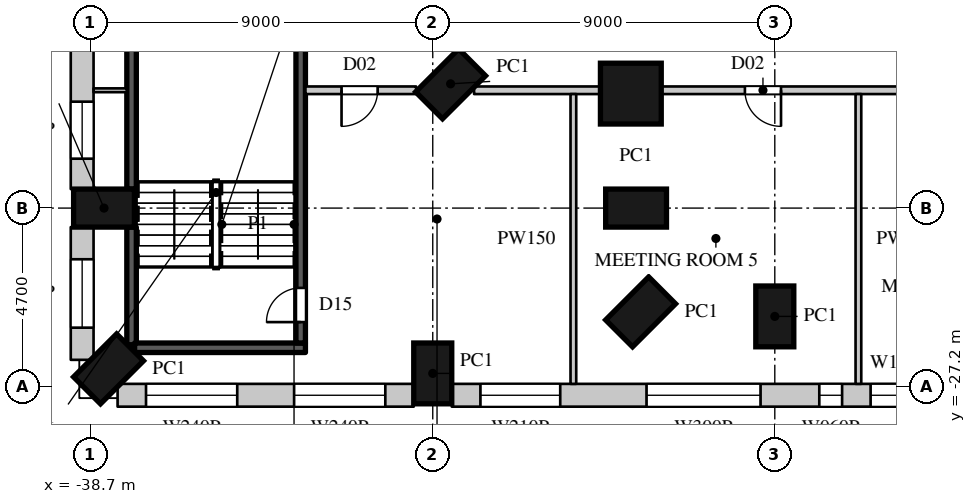
"""IFC4 building model, lengths in metres.
Left out: names, types, materials, properties, quantities, classifications, styles, units other than length and angle.
Written with IfcOpenShell. Run it as: python <this file> out.ifc"""

import sys

from ifc_helpers import new_model, si_unit, direction, frame, frame_2d, origin, origin_2d, place, context, subcontext, project, spatial, rectangle, circle, extrude, element, fill, save


model = new_model("IFC4")
c1 = context("Model", 3, precision=1e-05, world=origin(), true_north=direction((0.0, 1.0)))
c2 = subcontext(c1, "Body", "Model", "MODEL_VIEW")
j1 = project(units=[si_unit("LENGTHUNIT", "METRE"), si_unit("PLANEANGLEUNIT", "RADIAN")], contexts=[c1])
p1 = place(None, origin())
s1 = spatial("IfcSite", under=j1, at=p1, CompositionType="ELEMENT")
p2 = place(p1, origin())
s2 = spatial("IfcBuilding", under=s1, at=p2, CompositionType="ELEMENT")
p3 = place(p2, frame((0.0, 0.0, 44.0)))
s3 = spatial("IfcBuildingStorey", under=s2, at=p3, CompositionType="ELEMENT", Elevation=44.0)
p4 = place(p3, frame((-29.231, -19.231, 0.0), z_axis=(0.0, 0.0, 1.0), x_axis=(0.707106781187, -0.707106781187, 0.0)))
e1 = element("IfcColumn", 1, at=p4, inside=s3, PredefinedType="COLUMN", context=c2, shape_type="SweptSolid", body=[
    extrude(rectangle(XDim=1.0, YDim=1.6, at=origin_2d()), origin(), (0.0, 0.0, 1.0), 6.0),
])
p5 = place(p3, frame((-24.488, -19.488, 0.0), z_axis=(0.0, 0.0, 1.0), x_axis=(1.0, 0.0, 0.0)))
e2 = element("IfcColumn", 2, at=p5, inside=s3, PredefinedType="COLUMN", context=c2, shape_type="SweptSolid", body=[
    extrude(circle(Radius=0.8, at=origin_2d()), origin(), (0.0, 0.0, 1.0), 6.0),
])
for number, where, z_axis, x_axis in (
    (3, (-24.35, -22.5, 0.0), (0.0, 0.0, 1.0), (0.0, -1.0, 0.0)),
    (4, (-24.231, -25.231, 0.0), (0.0, 0.0, 1.0), (0.707, -0.707, 0.0)),
    (5, (-20.7, -25.35, 0.0), (0.0, 0.0, 1.0), (1.0, 0.0, 0.0)),
    (6, (-38.231, -26.731, 0.0), (0.0, 0.0, 1.0), (0.707, -0.707, 0.0)),
    (7, (-29.7, -26.85, 0.0), (0.0, 0.0, 1.0), (1.0, 0.0, 0.0)),
    (8, (-38.35, -22.5, 0.0), (0.0, 0.0, 1.0), (0.0, -1.0, 0.0)),
):
    element("IfcColumn", number, at=place(p3, frame(where, z_axis=z_axis, x_axis=x_axis)), inside=s3, PredefinedType="COLUMN", context=c2, shape_type="SweptSolid", body=[
        extrude(rectangle(XDim=1.0, YDim=1.6, at=origin_2d()), origin(), (0.0, 0.0, 1.0), 6.0),
    ])
p6 = place(p3, frame((-37.993, -27.425, 0.0), z_axis=(0.0, 0.0, 1.0), x_axis=(1.0, 0.0, 0.0)))
e9 = element("IfcWall", 9, at=p6, inside=s3, PredefinedType="ELEMENTEDWALL", context=c2, shape_type="SweptSolid", body=[
    extrude(rectangle(XDim=7.793, YDim=0.6, at=frame_2d((3.896, 0.0))), origin(), (0.0, 0.0, 1.0), 5.596),
])
p7 = place(p6, frame((0.748, 0.0, 1.2)))
e10 = element("IfcOpeningElement", 10, at=p7, cuts=e9, PredefinedType="OPENING", context=c2, shape_type="SweptSolid", body=[
    extrude(rectangle(XDim=2.4, YDim=2.4, at=frame_2d((1.2, 1.2))), frame((0.0, 0.31, 0.0), z_axis=(0.0, -1.0, 0.0), x_axis=(1.0, 0.0, 0.0)), (0.0, 0.0, 1.0), 0.62),
])
p8 = place(p6, frame((4.645, 0.0, 1.2)))
e11 = element("IfcOpeningElement", 11, at=p8, cuts=e9, PredefinedType="OPENING", context=c2, shape_type="SweptSolid", body=[
    extrude(rectangle(XDim=2.4, YDim=2.4, at=frame_2d((1.2, 1.2))), frame((0.0, 0.31, 0.0), z_axis=(0.0, -1.0, 0.0), x_axis=(1.0, 0.0, 0.0)), (0.0, 0.0, 1.0), 0.62),
])
p9 = place(p3, frame((-29.2, -27.425, 0.0), z_axis=(0.0, 0.0, 1.0), x_axis=(1.0, 0.0, 0.0)))
e12 = element("IfcWall", 12, at=p9, inside=s3, PredefinedType="ELEMENTEDWALL", context=c2, shape_type="SweptSolid", body=[
    extrude(rectangle(XDim=53.0, YDim=0.6, at=frame_2d((26.5, 0.0))), origin(), (0.0, 0.0, 1.0), 5.596),
])
p10 = place(p9, frame((5.125, 0.0, 1.2)))
e13 = element("IfcOpeningElement", 13, at=p10, cuts=e12, PredefinedType="OPENING", context=c2, shape_type="SweptSolid", body=[
    extrude(rectangle(XDim=3.0, YDim=2.4, at=frame_2d((1.5, 1.2))), frame((0.0, 0.31, 0.0), z_axis=(0.0, -1.0, 0.0), x_axis=(1.0, 0.0, 0.0)), (0.0, 0.0, 1.0), 0.62),
])
p11 = place(p9, frame((22.792, 0.0, 1.2)))
e14 = element("IfcOpeningElement", 14, at=p11, cuts=e12, PredefinedType="OPENING", context=c2, shape_type="SweptSolid", body=[
    extrude(rectangle(XDim=3.0, YDim=2.4, at=frame_2d((1.5, 1.2))), frame((0.0, 0.31, 0.0), z_axis=(0.0, -1.0, 0.0), x_axis=(1.0, 0.0, 0.0)), (0.0, 0.0, 1.0), 0.62),
])
p12 = place(p9, frame((27.208, 0.0, 1.2)))
e15 = element("IfcOpeningElement", 15, at=p12, cuts=e12, PredefinedType="OPENING", context=c2, shape_type="SweptSolid", body=[
    extrude(rectangle(XDim=3.0, YDim=2.4, at=frame_2d((1.5, 1.2))), frame((0.0, 0.31, 0.0), z_axis=(0.0, -1.0, 0.0), x_axis=(1.0, 0.0, 0.0)), (0.0, 0.0, 1.0), 0.62),
])
p13 = place(p9, frame((31.625, 0.0, 1.2)))
e16 = element("IfcOpeningElement", 16, at=p13, cuts=e12, PredefinedType="OPENING", context=c2, shape_type="SweptSolid", body=[
    extrude(rectangle(XDim=3.0, YDim=2.4, at=frame_2d((1.5, 1.2))), frame((0.0, 0.31, 0.0), z_axis=(0.0, -1.0, 0.0), x_axis=(1.0, 0.0, 0.0)), (0.0, 0.0, 1.0), 0.62),
])
p14 = place(p9, frame((36.042, 0.0, 1.2)))
e17 = element("IfcOpeningElement", 17, at=p14, cuts=e12, PredefinedType="OPENING", context=c2, shape_type="SweptSolid", body=[
    extrude(rectangle(XDim=3.0, YDim=2.4, at=frame_2d((1.5, 1.2))), frame((0.0, 0.31, 0.0), z_axis=(0.0, -1.0, 0.0), x_axis=(1.0, 0.0, 0.0)), (0.0, 0.0, 1.0), 0.62),
])
p15 = place(p9, frame((40.458, 0.0, 1.2)))
e18 = element("IfcOpeningElement", 18, at=p15, cuts=e12, PredefinedType="OPENING", context=c2, shape_type="SweptSolid", body=[
    extrude(rectangle(XDim=3.0, YDim=2.4, at=frame_2d((1.5, 1.2))), frame((0.0, 0.31, 0.0), z_axis=(0.0, -1.0, 0.0), x_axis=(1.0, 0.0, 0.0)), (0.0, 0.0, 1.0), 0.62),
])
p16 = place(p9, frame((44.875, 0.0, 1.2)))
e19 = element("IfcOpeningElement", 19, at=p16, cuts=e12, PredefinedType="OPENING", context=c2, shape_type="SweptSolid", body=[
    extrude(rectangle(XDim=3.0, YDim=2.4, at=frame_2d((1.5, 1.2))), frame((0.0, 0.31, 0.0), z_axis=(0.0, -1.0, 0.0), x_axis=(1.0, 0.0, 0.0)), (0.0, 0.0, 1.0), 0.62),
])
p17 = place(p9, frame((49.292, 0.0, 1.2)))
e20 = element("IfcOpeningElement", 20, at=p17, cuts=e12, PredefinedType="OPENING", context=c2, shape_type="SweptSolid", body=[
    extrude(rectangle(XDim=3.0, YDim=2.4, at=frame_2d((1.5, 1.2))), frame((0.0, 0.31, 0.0), z_axis=(0.0, -1.0, 0.0), x_axis=(1.0, 0.0, 0.0)), (0.0, 0.0, 1.0), 0.62),
])
p18 = place(p9, frame((0.754, 0.0, 1.2)))
e21 = element("IfcOpeningElement", 21, at=p18, cuts=e12, PredefinedType="OPENING", context=c2, shape_type="SweptSolid", body=[
    extrude(rectangle(XDim=2.1, YDim=2.4, at=frame_2d((1.05, 1.2))), frame((0.0, 0.31, 0.0), z_axis=(0.0, -1.0, 0.0), x_axis=(1.0, 0.0, 0.0)), (0.0, 0.0, 1.0), 0.62),
])
p19 = place(p9, frame((9.671, 0.0, 1.2)))
e22 = element("IfcOpeningElement", 22, at=p19, cuts=e12, PredefinedType="OPENING", context=c2, shape_type="SweptSolid", body=[
    extrude(rectangle(XDim=0.6, YDim=2.4, at=frame_2d((0.3, 1.2))), frame((0.0, 0.31, 0.0), z_axis=(0.0, -1.0, 0.0), x_axis=(1.0, 0.0, 0.0)), (0.0, 0.0, 1.0), 0.62),
])
p20 = place(p9, frame((11.021, 0.0, 1.2)))
e23 = element("IfcOpeningElement", 23, at=p20, cuts=e12, PredefinedType="OPENING", context=c2, shape_type="SweptSolid", body=[
    extrude(rectangle(XDim=1.5, YDim=2.4, at=frame_2d((0.75, 1.2))), frame((0.0, 0.31, 0.0), z_axis=(0.0, -1.0, 0.0), x_axis=(1.0, 0.0, 0.0)), (0.0, 0.0, 1.0), 0.62),
])
p21 = place(p9, frame((14.029, 0.0, 1.2)))
e24 = element("IfcOpeningElement", 24, at=p21, cuts=e12, PredefinedType="OPENING", context=c2, shape_type="SweptSolid", body=[
    extrude(rectangle(XDim=1.8, YDim=2.4, at=frame_2d((0.9, 1.2))), frame((0.0, 0.31, 0.0), z_axis=(0.0, -1.0, 0.0), x_axis=(1.0, 0.0, 0.0)), (0.0, 0.0, 1.0), 0.62),
])
p22 = place(p9, frame((19.137, 0.0, 1.2)))
e25 = element("IfcOpeningElement", 25, at=p22, cuts=e12, PredefinedType="OPENING", context=c2, shape_type="SweptSolid", body=[
    extrude(rectangle(XDim=2.1, YDim=2.4, at=frame_2d((1.05, 1.2))), frame((0.0, 0.31, 0.0), z_axis=(0.0, -1.0, 0.0), x_axis=(1.0, 0.0, 0.0)), (0.0, 0.0, 1.0), 0.62),
])
p23 = place(p3, frame((-38.925, -14.0, 0.0), z_axis=(0.0, 0.0, 1.0), x_axis=(0.0, -1.0, 0.0)))
e26 = element("IfcWall", 26, at=p23, inside=s3, PredefinedType="ELEMENTEDWALL", context=c2, shape_type="SweptSolid", body=[
    extrude(rectangle(XDim=8.0, YDim=0.6, at=frame_2d((4.0, 0.0))), origin(), (0.0, 0.0, 1.0), 5.596),
])
p24 = place(p23, frame((1.35, 0.0, 1.2)))
e27 = element("IfcOpeningElement", 27, at=p24, cuts=e26, PredefinedType="OPENING", context=c2, shape_type="SweptSolid", body=[
    extrude(rectangle(XDim=1.8, YDim=2.4, at=frame_2d((0.9, 1.2))), frame((0.0, 0.31, 0.0), z_axis=(0.0, -1.0, 0.0), x_axis=(1.0, 0.0, 0.0)), (0.0, 0.0, 1.0), 0.62),
])
p25 = place(p23, frame((5.7, 0.0, 1.2)))
e28 = element("IfcOpeningElement", 28, at=p25, cuts=e26, PredefinedType="OPENING", context=c2, shape_type="SweptSolid", body=[
    extrude(rectangle(XDim=1.5, YDim=2.4, at=frame_2d((0.75, 1.2))), frame((0.0, 0.31, 0.0), z_axis=(0.0, -1.0, 0.0), x_axis=(1.0, 0.0, 0.0)), (0.0, 0.0, 1.0), 0.62),
])
p26 = place(p3, frame((-38.925, -23.0, 0.0), z_axis=(0.0, 0.0, 1.0), x_axis=(0.0, -1.0, 0.0)))
e29 = element("IfcWall", 29, at=p26, inside=s3, PredefinedType="ELEMENTEDWALL", context=c2, shape_type="SweptSolid", body=[
    extrude(rectangle(XDim=3.493, YDim=0.6, at=frame_2d((1.747, 0.0))), origin(), (0.0, 0.0, 1.0), 5.596),
])
p27 = place(p26, frame((0.846, 0.0, 1.2)))
e30 = element("IfcOpeningElement", 30, at=p27, cuts=e29, PredefinedType="OPENING", context=c2, shape_type="SweptSolid", body=[
    extrude(rectangle(XDim=1.8, YDim=2.4, at=frame_2d((0.9, 1.2))), frame((0.0, 0.31, 0.0), z_axis=(0.0, -1.0, 0.0), x_axis=(1.0, 0.0, 0.0)), (0.0, 0.0, 1.0), 0.62),
])
p28 = place(p3, frame((-33.05, -19.4, 0.0), z_axis=(0.0, 0.0, 1.0), x_axis=(1.0, 0.0, 0.0)))
e31 = element("IfcWall", 31, at=p28, inside=s3, PredefinedType="PARTITIONING", context=c2, shape_type="SweptSolid", body=[
    extrude(rectangle(XDim=2.913, YDim=0.2, at=frame_2d((1.457, 0.0))), origin(), (0.0, 0.0, 1.0), 5.596),
])
p29 = place(p28, frame((0.95, 0.0, 0.0)))
e32 = element("IfcOpeningElement", 32, at=p29, cuts=e31, PredefinedType="OPENING", context=c2, shape_type="SweptSolid", body=[
    extrude(rectangle(XDim=0.95, YDim=2.2, at=frame_2d((0.475, 1.1))), frame((0.0, 0.11, 0.0), z_axis=(0.0, -1.0, 0.0), x_axis=(1.0, 0.0, 0.0)), (0.0, 0.0, 1.0), 0.22),
])
p30 = place(p3, frame((-28.613, -19.4, 0.0), z_axis=(0.0, 0.0, 1.0), x_axis=(1.0, 0.0, 0.0)))
e33 = element("IfcWall", 33, at=p30, inside=s3, PredefinedType="PARTITIONING", context=c2, shape_type="SweptSolid", body=[
    extrude(rectangle(XDim=3.323, YDim=0.2, at=frame_2d((1.662, 0.0))), origin(), (0.0, 0.0, 1.0), 3.85),
])
p31 = place(p3, frame((-23.687, -19.4, 0.0), z_axis=(0.0, 0.0, 1.0), x_axis=(1.0, 0.0, 0.0)))
e34 = element("IfcWall", 34, at=p31, inside=s3, PredefinedType="PARTITIONING", context=c2, shape_type="SweptSolid", body=[
    extrude(rectangle(XDim=13.086, YDim=0.2, at=frame_2d((6.543, 0.0))), origin(), (0.0, 0.0, 1.0), 5.596),
])
p32 = place(p31, frame((2.2, 0.0, 0.0)))
e35 = element("IfcOpeningElement", 35, at=p32, cuts=e34, PredefinedType="OPENING", context=c2, shape_type="SweptSolid", body=[
    extrude(rectangle(XDim=0.95, YDim=2.2, at=frame_2d((0.475, 1.1))), frame((0.0, 0.11, 0.0), z_axis=(0.0, -1.0, 0.0), x_axis=(1.0, 0.0, 0.0)), (0.0, 0.0, 1.0), 0.22),
])
p33 = place(p31, frame((7.45, 0.0, 0.0)))
e36 = element("IfcOpeningElement", 36, at=p33, cuts=e34, PredefinedType="OPENING", context=c2, shape_type="SweptSolid", body=[
    extrude(rectangle(XDim=0.95, YDim=2.2, at=frame_2d((0.475, 1.1))), frame((0.0, 0.11, 0.0), z_axis=(0.0, -1.0, 0.0), x_axis=(1.0, 0.0, 0.0)), (0.0, 0.0, 1.0), 0.22),
])
p34 = place(p31, frame((11.3, 0.0, 0.0)))
e37 = element("IfcOpeningElement", 37, at=p34, cuts=e34, PredefinedType="OPENING", context=c2, shape_type="SweptSolid", body=[
    extrude(rectangle(XDim=0.95, YDim=2.2, at=frame_2d((0.475, 1.1))), frame((0.0, 0.11, 0.0), z_axis=(0.0, -1.0, 0.0), x_axis=(1.0, 0.0, 0.0)), (0.0, 0.0, 1.0), 0.22),
])
for number, where, z_axis, x_axis in (
    (38, (-26.0, -27.125, 0.0), (0.0, 0.0, 1.0), (0.0, 1.0, 0.0)),
    (39, (-18.5, -27.125, 0.0), (0.0, 0.0, 1.0), (0.0, 1.0, 0.0)),
):
    element("IfcWall", number, at=place(p3, frame(where, z_axis=z_axis, x_axis=x_axis)), inside=s3, PredefinedType="PARTITIONING", context=c2, shape_type="SweptSolid", body=[
        extrude(rectangle(XDim=7.625, YDim=0.15, at=frame_2d((3.812, 0.0))), origin(), (0.0, 0.0, 1.0), 5.596),
    ])
p35 = place(p3, frame((-37.625, -26.095, 0.0), z_axis=(0.0, 0.0, 1.0), x_axis=(0.0, 1.0, 0.0)))
e40 = element("IfcWall", 40, at=p35, inside=s3, PredefinedType="SHEAR", context=c2, shape_type="SweptSolid", body=[
    extrude(rectangle(XDim=3.095, YDim=0.25, at=frame_2d((1.548, 0.0))), origin(), (0.0, 0.0, 1.0), 5.596),
])
p36 = place(p3, frame((-37.625, -22.0, 0.0), z_axis=(0.0, 0.0, 1.0), x_axis=(0.0, 1.0, 0.0)))
e41 = element("IfcWall", 41, at=p36, inside=s3, PredefinedType="SHEAR", context=c2, shape_type="SweptSolid", body=[
    extrude(rectangle(XDim=3.87, YDim=0.25, at=frame_2d((1.935, 0.0))), origin(), (0.0, 0.0, 1.0), 5.596),
])
p37 = place(p3, frame((-37.545, -26.175, 0.0), z_axis=(0.0, 0.0, 1.0), x_axis=(1.0, 0.0, 0.0)))
e42 = element("IfcWall", 42, at=p37, inside=s3, PredefinedType="SHEAR", context=c2, shape_type="SweptSolid", body=[
    extrude(rectangle(XDim=4.495, YDim=0.25, at=frame_2d((2.248, 0.0))), origin(), (0.0, 0.0, 1.0), 5.596),
])
p38 = place(p3, frame((-33.175, -26.05, 0.0), z_axis=(0.0, 0.0, 1.0), x_axis=(0.0, 1.0, 0.0)))
e43 = element("IfcWall", 43, at=p38, inside=s3, PredefinedType="SHEAR", context=c2, shape_type="SweptSolid", body=[
    extrude(rectangle(XDim=7.92, YDim=0.25, at=frame_2d((3.96, 0.0))), origin(), (0.0, 0.0, 1.0), 5.596),
])
p39 = place(p38, frame((0.55, 0.0, 0.0)))
e44 = element("IfcOpeningElement", 44, at=p39, cuts=e43, PredefinedType="OPENING", context=c2, shape_type="SweptSolid", body=[
    extrude(rectangle(XDim=0.9, YDim=2.2, at=frame_2d((0.45, 1.1))), frame((0.0, 0.135, 0.0), z_axis=(0.0, -1.0, 0.0), x_axis=(1.0, 0.0, 0.0)), (0.0, 0.0, 1.0), 0.27),
])
p40 = place(p3, frame((-38.625, -19.4, 0.0), z_axis=(0.0, 0.0, 1.0), x_axis=(1.0, 0.0, 0.0)))
e45 = element("IfcWall", 45, at=p40, inside=s3, PredefinedType="PARTITIONING", context=c2, shape_type="SweptSolid", body=[
    extrude(rectangle(XDim=0.875, YDim=0.1, at=frame_2d((0.438, 0.0))), origin(), (0.0, 0.0, 1.0), 5.596),
])
p41 = place(p7, origin())
e46 = element("IfcWindow", 46, at=p41, inside=s3, PartitioningType="SINGLE_PANEL", PredefinedType="WINDOW", context=c2, shape_type="SweptSolid", body=[
    extrude(rectangle(XDim=2.4, YDim=2.4, at=frame_2d((1.2, 1.2))), frame((0.0, 0.06, 0.0), z_axis=(0.0, -1.0, 0.0), x_axis=(1.0, 0.0, 0.0)), (0.0, 0.0, 1.0), 0.06),
])
fill(e10, e46)
p42 = place(p8, origin())
e47 = element("IfcWindow", 47, at=p42, inside=s3, PartitioningType="SINGLE_PANEL", PredefinedType="WINDOW", context=c2, shape_type="SweptSolid", body=[
    extrude(rectangle(XDim=2.4, YDim=2.4, at=frame_2d((1.2, 1.2))), frame((0.0, 0.06, 0.0), z_axis=(0.0, -1.0, 0.0), x_axis=(1.0, 0.0, 0.0)), (0.0, 0.0, 1.0), 0.06),
])
fill(e11, e47)
p43 = place(p10, origin())
e48 = element("IfcWindow", 48, at=p43, inside=s3, PartitioningType="SINGLE_PANEL", PredefinedType="WINDOW", context=c2, shape_type="SweptSolid", body=[
    extrude(rectangle(XDim=3.0, YDim=2.4, at=frame_2d((1.5, 1.2))), frame((0.0, 0.06, 0.0), z_axis=(0.0, -1.0, 0.0), x_axis=(1.0, 0.0, 0.0)), (0.0, 0.0, 1.0), 0.06),
])
fill(e13, e48)
p44 = place(p27, origin())
e49 = element("IfcWindow", 49, at=p44, inside=s3, PartitioningType="SINGLE_PANEL", PredefinedType="WINDOW", context=c2, shape_type="SweptSolid", body=[
    extrude(rectangle(XDim=1.8, YDim=2.4, at=frame_2d((0.9, 1.2))), frame((0.0, 0.06, 0.0), z_axis=(0.0, -1.0, 0.0), x_axis=(1.0, 0.0, 0.0)), (0.0, 0.0, 1.0), 0.06),
])
fill(e30, e49)
p45 = place(p29, origin())
e50 = element("IfcDoor", 50, at=p45, inside=s3, OperationType="SINGLE_SWING_RIGHT", PredefinedType="DOOR", context=c2, shape_type="SweptSolid", body=[
    extrude(rectangle(XDim=0.95, YDim=2.2, at=frame_2d((0.475, 1.1))), frame((0.0, 0.025, 0.0), z_axis=(0.0, -1.0, 0.0), x_axis=(1.0, 0.0, 0.0)), (0.0, 0.0, 1.0), 0.05),
])
fill(e32, e50)
p46 = place(p32, origin())
e51 = element("IfcDoor", 51, at=p46, inside=s3, OperationType="SINGLE_SWING_LEFT", PredefinedType="DOOR", context=c2, shape_type="SweptSolid", body=[
    extrude(rectangle(XDim=0.95, YDim=2.2, at=frame_2d((0.475, 1.1))), frame((0.0, 0.025, 0.0), z_axis=(0.0, -1.0, 0.0), x_axis=(1.0, 0.0, 0.0)), (0.0, 0.0, 1.0), 0.05),
])
fill(e35, e51)
p47 = place(p39, origin())
e52 = element("IfcDoor", 52, at=p47, inside=s3, OperationType="SINGLE_SWING_LEFT", PredefinedType="DOOR", context=c2, shape_type="SweptSolid", body=[
    extrude(rectangle(XDim=0.9, YDim=2.2, at=frame_2d((0.45, 1.1))), frame((0.0, 0.025, 0.0), z_axis=(0.0, -1.0, 0.0), x_axis=(1.0, 0.0, 0.0)), (0.0, 0.0, 1.0), 0.05),
])
fill(e44, e52)
p48 = place(p18, origin())
e53 = element("IfcWindow", 53, at=p48, inside=s3, PartitioningType="SINGLE_PANEL", PredefinedType="WINDOW", context=c2, shape_type="SweptSolid", body=[
    extrude(rectangle(XDim=2.1, YDim=2.4, at=frame_2d((1.05, 1.2))), frame((0.0, 0.06, 0.0), z_axis=(0.0, -1.0, 0.0), x_axis=(1.0, 0.0, 0.0)), (0.0, 0.0, 1.0), 0.06),
])
fill(e21, e53)
p49 = place(p19, origin())
e54 = element("IfcWindow", 54, at=p49, inside=s3, PartitioningType="SINGLE_PANEL", PredefinedType="WINDOW", context=c2, shape_type="SweptSolid", body=[
    extrude(rectangle(XDim=0.6, YDim=2.4, at=frame_2d((0.3, 1.2))), frame((0.0, 0.06, 0.0), z_axis=(0.0, -1.0, 0.0), x_axis=(1.0, 0.0, 0.0)), (0.0, 0.0, 1.0), 0.06),
])
fill(e22, e54)
p50 = place(p20, origin())
e55 = element("IfcWindow", 55, at=p50, inside=s3, PartitioningType="SINGLE_PANEL", PredefinedType="WINDOW", context=c2, shape_type="SweptSolid", body=[
    extrude(rectangle(XDim=1.5, YDim=2.4, at=frame_2d((0.75, 1.2))), frame((0.0, 0.06, 0.0), z_axis=(0.0, -1.0, 0.0), x_axis=(1.0, 0.0, 0.0)), (0.0, 0.0, 1.0), 0.06),
])
fill(e23, e55)
p51 = place(p25, origin())
e56 = element("IfcWindow", 56, at=p51, inside=s3, PartitioningType="SINGLE_PANEL", PredefinedType="WINDOW", context=c2, shape_type="SweptSolid", body=[
    extrude(rectangle(XDim=1.5, YDim=2.4, at=frame_2d((0.75, 1.2))), frame((0.0, 0.06, 0.0), z_axis=(0.0, -1.0, 0.0), x_axis=(1.0, 0.0, 0.0)), (0.0, 0.0, 1.0), 0.06),
])
fill(e28, e56)
save(model, sys.argv[1])
